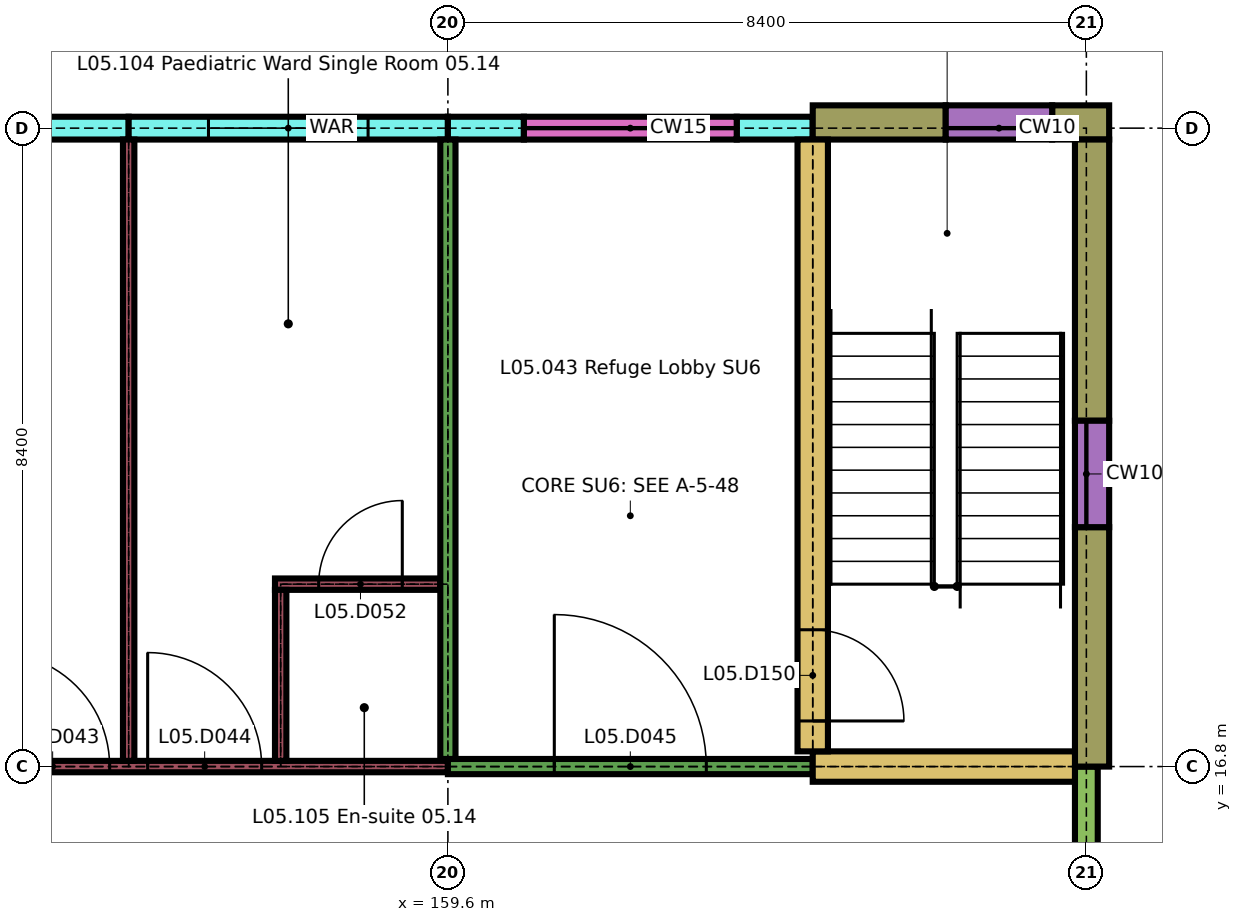
"""IFC4 building model, lengths in metres.
Left out: names, types, materials, properties, quantities, classifications, styles, units other than length and angle.
Written with IfcOpenShell. Run it as: python <this file> out.ifc"""

import sys

from ifc_helpers import new_model, si_unit, direction, frame, frame_2d, origin, place, context, subcontext, project, spatial, rectangle, extrude, element, fill, save


model = new_model("IFC4")
c1 = context("Model", 3, precision=1e-05, world=origin(), true_north=direction((0.0, 1.0)))
c2 = subcontext(c1, "Body", "Model", "MODEL_VIEW")
j1 = project(units=[si_unit("LENGTHUNIT", "METRE"), si_unit("PLANEANGLEUNIT", "RADIAN")], contexts=[c1])
p1 = place(None, origin())
s1 = spatial("IfcSite", under=j1, at=p1, CompositionType="ELEMENT")
p2 = place(p1, origin())
s2 = spatial("IfcBuilding", under=s1, at=p2, CompositionType="ELEMENT")
p3 = place(p2, frame((0.0, 0.0, 22.5)))
s3 = spatial("IfcBuildingStorey", under=s2, at=p3, CompositionType="ELEMENT", Elevation=22.5)
p4 = place(p3, frame((151.55, 25.2, 0.0), z_axis=(0.0, 0.0, 1.0), x_axis=(1.0, 0.0, 0.0)))
e1 = element("IfcWall", 1, at=p4, inside=s3, PredefinedType="SOLIDWALL", context=c2, shape_type="SweptSolid", body=[
    extrude(rectangle(XDim=3.85, YDim=0.3, at=frame_2d((1.925, 0.0))), origin(), (0.0, 0.0, 1.0), 3.26),
])
p5 = place(p4, frame((0.7, 0.0, 0.9)))
e2 = element("IfcOpeningElement", 2, at=p5, cuts=e1, PredefinedType="OPENING", context=c2, shape_type="SweptSolid", body=[
    extrude(rectangle(XDim=2.1, YDim=1.5, at=frame_2d((1.05, 0.75))), frame((0.0, 0.16, 0.0), z_axis=(0.0, -1.0, 0.0), x_axis=(1.0, 0.0, 0.0)), (0.0, 0.0, 1.0), 0.32),
])
p6 = place(p3, frame((155.4, 25.2, 0.0), z_axis=(0.0, 0.0, 1.0), x_axis=(1.0, 0.0, 0.0)))
e3 = element("IfcWall", 3, at=p6, inside=s3, PredefinedType="SOLIDWALL", context=c2, shape_type="SweptSolid", body=[
    extrude(rectangle(XDim=4.2, YDim=0.3, at=frame_2d((2.1, 0.0))), origin(), (0.0, 0.0, 1.0), 3.26),
])
p7 = place(p6, frame((1.05, 0.0, 0.9)))
e4 = element("IfcOpeningElement", 4, at=p7, cuts=e3, PredefinedType="OPENING", context=c2, shape_type="SweptSolid", body=[
    extrude(rectangle(XDim=2.1, YDim=1.5, at=frame_2d((1.05, 0.75))), frame((0.0, 0.16, 0.0), z_axis=(0.0, -1.0, 0.0), x_axis=(1.0, 0.0, 0.0)), (0.0, 0.0, 1.0), 0.32),
])
for number, where, z_axis, x_axis in (
    (5, (159.6, 25.2, 0.0), (0.0, 0.0, 1.0), (1.0, 0.0, 0.0)),
    (6, (163.4, 25.2, 0.0), (0.0, 0.0, 1.0), (1.0, 0.0, 0.0)),
):
    element("IfcWall", number, at=place(p3, frame(where, z_axis=z_axis, x_axis=x_axis)), inside=s3, PredefinedType="SOLIDWALL", context=c2, shape_type="SweptSolid", body=[
        extrude(rectangle(XDim=1.0, YDim=0.3, at=frame_2d((0.5, 0.0))), origin(), (0.0, 0.0, 1.0), 3.26),
    ])
p8 = place(p3, frame((160.6, 25.2, 0.0), z_axis=(0.0, 0.0, 1.0), x_axis=(1.0, 0.0, 0.0)))
e7 = element("IfcWall", 7, at=p8, inside=s3, PredefinedType="SOLIDWALL", context=c2, shape_type="SweptSolid", body=[
    extrude(rectangle(XDim=2.8, YDim=0.3, at=frame_2d((1.4, 0.0))), origin(), (0.0, 0.0, 1.0), 0.6),
])
p9 = place(p3, frame((164.4, 25.275, 0.0), z_axis=(0.0, 0.0, 1.0), x_axis=(1.0, 0.0, 0.0)))
e8 = element("IfcWall", 8, at=p9, inside=s3, PredefinedType="SOLIDWALL", context=c2, shape_type="SweptSolid", body=[
    extrude(rectangle(XDim=1.75, YDim=0.45, at=frame_2d((0.875, 0.0))), origin(), (0.0, 0.0, 1.0), 3.26),
])
p10 = place(p3, frame((167.55, 25.275, 0.0), z_axis=(0.0, 0.0, 1.0), x_axis=(1.0, 0.0, 0.0)))
e9 = element("IfcWall", 9, at=p10, inside=s3, PredefinedType="SOLIDWALL", context=c2, shape_type="SweptSolid", body=[
    extrude(rectangle(XDim=0.75, YDim=0.45, at=frame_2d((0.375, 0.0))), origin(), (0.0, 0.0, 1.0), 3.26),
])
p11 = place(p3, frame((166.15, 25.275, 0.0), z_axis=(0.0, 0.0, 1.0), x_axis=(1.0, 0.0, 0.0)))
e10 = element("IfcWall", 10, at=p11, inside=s3, PredefinedType="SOLIDWALL", context=c2, shape_type="SweptSolid", body=[
    extrude(rectangle(XDim=1.4, YDim=0.45, at=frame_2d((0.7, 0.0))), origin(), (0.0, 0.0, 1.0), 0.6),
])
p12 = place(p3, frame((168.0, 13.8, 0.0), z_axis=(0.0, 0.0, 1.0), x_axis=(0.0, 1.0, 0.0)))
e11 = element("IfcWall", 11, at=p12, inside=s3, PredefinedType="SOLIDWALL", context=c2, shape_type="SweptSolid", body=[
    extrude(rectangle(XDim=3.0, YDim=0.3, at=frame_2d((1.5, 0.0))), origin(), (0.0, 0.0, 1.0), 2.96),
])
p13 = place(p12, frame((0.45, 0.0, 0.9)))
e12 = element("IfcOpeningElement", 12, at=p13, cuts=e11, PredefinedType="OPENING", context=c2, shape_type="SweptSolid", body=[
    extrude(rectangle(XDim=0.9, YDim=1.5, at=frame_2d((0.45, 0.75))), frame((0.0, 0.16, 0.0), z_axis=(0.0, -1.0, 0.0), x_axis=(1.0, 0.0, 0.0)), (0.0, 0.0, 1.0), 0.32),
])
p14 = place(p3, frame((168.075, 16.8, 0.0), z_axis=(0.0, 0.0, 1.0), x_axis=(0.0, 1.0, 0.0)))
e13 = element("IfcWall", 13, at=p14, inside=s3, PredefinedType="SOLIDWALL", context=c2, shape_type="SweptSolid", body=[
    extrude(rectangle(XDim=3.15, YDim=0.45, at=frame_2d((1.575, 0.0))), origin(), (0.0, 0.0, 1.0), 3.26),
])
p15 = place(p3, frame((168.075, 21.35, 0.0), z_axis=(0.0, 0.0, 1.0), x_axis=(0.0, 1.0, 0.0)))
e14 = element("IfcWall", 14, at=p15, inside=s3, PredefinedType="SOLIDWALL", context=c2, shape_type="SweptSolid", body=[
    extrude(rectangle(XDim=3.7, YDim=0.45, at=frame_2d((1.85, 0.0))), origin(), (0.0, 0.0, 1.0), 3.26),
])
p16 = place(p3, frame((168.075, 19.95, 0.0), z_axis=(0.0, 0.0, 1.0), x_axis=(0.0, 1.0, 0.0)))
e15 = element("IfcWall", 15, at=p16, inside=s3, PredefinedType="SOLIDWALL", context=c2, shape_type="SweptSolid", body=[
    extrude(rectangle(XDim=1.4, YDim=0.45, at=frame_2d((0.7, 0.0))), origin(), (0.0, 0.0, 1.0), 0.6),
])
p17 = place(p3, frame((151.55, 16.8, 0.0), z_axis=(0.0, 0.0, 1.0), x_axis=(1.0, 0.0, 0.0)))
e16 = element("IfcWall", 16, at=p17, inside=s3, PredefinedType="PARTITIONING", context=c2, shape_type="SweptSolid", body=[
    extrude(rectangle(XDim=8.05, YDim=0.15, at=frame_2d((4.025, 0.0))), origin(), (0.0, 0.0, 1.0), 3.26),
])
p18 = place(p17, frame((2.1, 0.0, 0.0)))
e17 = element("IfcOpeningElement", 17, at=p18, cuts=e16, PredefinedType="OPENING", context=c2, shape_type="SweptSolid", body=[
    extrude(rectangle(XDim=1.5, YDim=2.4, at=frame_2d((0.75, 1.2))), frame((0.0, 0.085, 0.0), z_axis=(0.0, -1.0, 0.0), x_axis=(1.0, 0.0, 0.0)), (0.0, 0.0, 1.0), 0.17),
])
p19 = place(p17, frame((4.1, 0.0, 0.0)))
e18 = element("IfcOpeningElement", 18, at=p19, cuts=e16, PredefinedType="OPENING", context=c2, shape_type="SweptSolid", body=[
    extrude(rectangle(XDim=1.5, YDim=2.4, at=frame_2d((0.75, 1.2))), frame((0.0, 0.085, 0.0), z_axis=(0.0, -1.0, 0.0), x_axis=(1.0, 0.0, 0.0)), (0.0, 0.0, 1.0), 0.17),
])
p20 = place(p3, frame((159.6, 16.8, 0.0), z_axis=(0.0, 0.0, 1.0), x_axis=(1.0, 0.0, 0.0)))
e19 = element("IfcWall", 19, at=p20, inside=s3, PredefinedType="PARTITIONING", context=c2, shape_type="SweptSolid", body=[
    extrude(rectangle(XDim=4.8, YDim=0.2, at=frame_2d((2.4, 0.0))), origin(), (0.0, 0.0, 1.0), 3.26),
])
p21 = place(p20, frame((1.4, 0.0, 0.0)))
e20 = element("IfcOpeningElement", 20, at=p21, cuts=e19, PredefinedType="OPENING", context=c2, shape_type="SweptSolid", body=[
    extrude(rectangle(XDim=2.0, YDim=2.4, at=frame_2d((1.0, 1.2))), frame((0.0, 0.11, 0.0), z_axis=(0.0, -1.0, 0.0), x_axis=(1.0, 0.0, 0.0)), (0.0, 0.0, 1.0), 0.22),
])
p22 = place(p3, frame((164.4, 16.8, 0.0), z_axis=(0.0, 0.0, 1.0), x_axis=(1.0, 0.0, 0.0)))
e21 = element("IfcWall", 21, at=p22, inside=s3, PredefinedType="SHEAR", context=c2, shape_type="SweptSolid", body=[
    extrude(rectangle(XDim=3.45, YDim=0.4, at=frame_2d((1.725, 0.0))), origin(), (0.0, 0.0, 1.0), 3.26),
])
p23 = place(p3, frame((157.325, 19.2, 0.0), z_axis=(0.0, 0.0, 1.0), x_axis=(1.0, 0.0, 0.0)))
e22 = element("IfcWall", 22, at=p23, inside=s3, PredefinedType="PARTITIONING", context=c2, shape_type="SweptSolid", body=[
    extrude(rectangle(XDim=2.175, YDim=0.15, at=frame_2d((1.087, 0.0))), origin(), (0.0, 0.0, 1.0), 3.26),
])
p24 = place(p23, frame((0.575, 0.0, 0.0)))
e23 = element("IfcOpeningElement", 23, at=p24, cuts=e22, PredefinedType="OPENING", context=c2, shape_type="SweptSolid", body=[
    extrude(rectangle(XDim=1.1, YDim=2.1, at=frame_2d((0.55, 1.05))), frame((0.0, 0.085, 0.0), z_axis=(0.0, -1.0, 0.0), x_axis=(1.0, 0.0, 0.0)), (0.0, 0.0, 1.0), 0.17),
])
p25 = place(p3, frame((155.4, 16.875, 0.0), z_axis=(0.0, 0.0, 1.0), x_axis=(0.0, 1.0, 0.0)))
e24 = element("IfcWall", 24, at=p25, inside=s3, PredefinedType="PARTITIONING", context=c2, shape_type="SweptSolid", body=[
    extrude(rectangle(XDim=8.175, YDim=0.15, at=frame_2d((4.087, 0.0))), origin(), (0.0, 0.0, 1.0), 3.26),
])
p26 = place(p3, frame((157.4, 16.875, 0.0), z_axis=(0.0, 0.0, 1.0), x_axis=(0.0, 1.0, 0.0)))
e25 = element("IfcWall", 25, at=p26, inside=s3, PredefinedType="PARTITIONING", context=c2, shape_type="SweptSolid", body=[
    extrude(rectangle(XDim=2.25, YDim=0.15, at=frame_2d((1.125, 0.0))), origin(), (0.0, 0.0, 1.0), 3.26),
])
p27 = place(p3, frame((159.6, 16.9, 0.0), z_axis=(0.0, 0.0, 1.0), x_axis=(0.0, 1.0, 0.0)))
e26 = element("IfcWall", 26, at=p27, inside=s3, PredefinedType="PARTITIONING", context=c2, shape_type="SweptSolid", body=[
    extrude(rectangle(XDim=8.15, YDim=0.2, at=frame_2d((4.075, 0.0))), origin(), (0.0, 0.0, 1.0), 3.26),
])
p28 = place(p3, frame((164.4, 17.0, 0.0), z_axis=(0.0, 0.0, 1.0), x_axis=(0.0, 1.0, 0.0)))
e27 = element("IfcWall", 27, at=p28, inside=s3, PredefinedType="SHEAR", context=c2, shape_type="SweptSolid", body=[
    extrude(rectangle(XDim=8.05, YDim=0.4, at=frame_2d((4.025, 0.0))), origin(), (0.0, 0.0, 1.0), 3.26),
])
p29 = place(p28, frame((0.4, 0.0, 0.0)))
e28 = element("IfcOpeningElement", 28, at=p29, cuts=e27, PredefinedType="OPENING", context=c2, shape_type="SweptSolid", body=[
    extrude(rectangle(XDim=1.2, YDim=2.1, at=frame_2d((0.6, 1.05))), frame((0.0, 0.21, 0.0), z_axis=(0.0, -1.0, 0.0), x_axis=(1.0, 0.0, 0.0)), (0.0, 0.0, 1.0), 0.42),
])
p30 = place(p7, origin())
e29 = element("IfcWindow", 29, at=p30, inside=s3, PartitioningType="DOUBLE_PANEL_VERTICAL", PredefinedType="WINDOW", context=c2, shape_type="SweptSolid", body=[
    extrude(rectangle(XDim=2.1, YDim=1.5, at=frame_2d((1.05, 0.75))), frame((0.0, 0.05, 0.0), z_axis=(0.0, -1.0, 0.0), x_axis=(1.0, 0.0, 0.0)), (0.0, 0.0, 1.0), 0.1),
])
fill(e4, e29)
p31 = place(p18, origin())
e30 = element("IfcDoor", 30, at=p31, inside=s3, OperationType="SINGLE_SWING_RIGHT", PredefinedType="DOOR", context=c2, shape_type="SweptSolid", body=[
    extrude(rectangle(XDim=1.5, YDim=2.4, at=frame_2d((0.75, 1.2))), frame((0.0, 0.03, 0.0), z_axis=(0.0, -1.0, 0.0), x_axis=(1.0, 0.0, 0.0)), (0.0, 0.0, 1.0), 0.06),
])
fill(e17, e30)
p32 = place(p19, origin())
e31 = element("IfcDoor", 31, at=p32, inside=s3, OperationType="SINGLE_SWING_RIGHT", PredefinedType="DOOR", context=c2, shape_type="SweptSolid", body=[
    extrude(rectangle(XDim=1.5, YDim=2.4, at=frame_2d((0.75, 1.2))), frame((0.0, 0.03, 0.0), z_axis=(0.0, -1.0, 0.0), x_axis=(1.0, 0.0, 0.0)), (0.0, 0.0, 1.0), 0.06),
])
fill(e18, e31)
p33 = place(p21, origin())
e32 = element("IfcDoor", 32, at=p33, inside=s3, OperationType="SINGLE_SWING_RIGHT", PredefinedType="DOOR", context=c2, shape_type="SweptSolid", body=[
    extrude(rectangle(XDim=2.0, YDim=2.4, at=frame_2d((1.0, 1.2))), frame((0.0, 0.03, 0.0), z_axis=(0.0, -1.0, 0.0), x_axis=(1.0, 0.0, 0.0)), (0.0, 0.0, 1.0), 0.06),
])
fill(e20, e32)
p34 = place(p24, origin())
e33 = element("IfcDoor", 33, at=p34, inside=s3, OperationType="SINGLE_SWING_LEFT", PredefinedType="DOOR", context=c2, shape_type="SweptSolid", body=[
    extrude(rectangle(XDim=1.1, YDim=2.1, at=frame_2d((0.55, 1.05))), frame((0.0, 0.025, 0.0), z_axis=(0.0, -1.0, 0.0), x_axis=(1.0, 0.0, 0.0)), (0.0, 0.0, 1.0), 0.05),
])
fill(e23, e33)
p35 = place(p29, origin())
e34 = element("IfcDoor", 34, at=p35, inside=s3, OperationType="SINGLE_SWING_LEFT", PredefinedType="DOOR", context=c2, shape_type="SweptSolid", body=[
    extrude(rectangle(XDim=1.2, YDim=2.1, at=frame_2d((0.6, 1.05))), frame((0.0, 0.025, 0.0), z_axis=(0.0, -1.0, 0.0), x_axis=(1.0, 0.0, 0.0)), (0.0, 0.0, 1.0), 0.05),
])
fill(e28, e34)
save(model, sys.argv[1])
